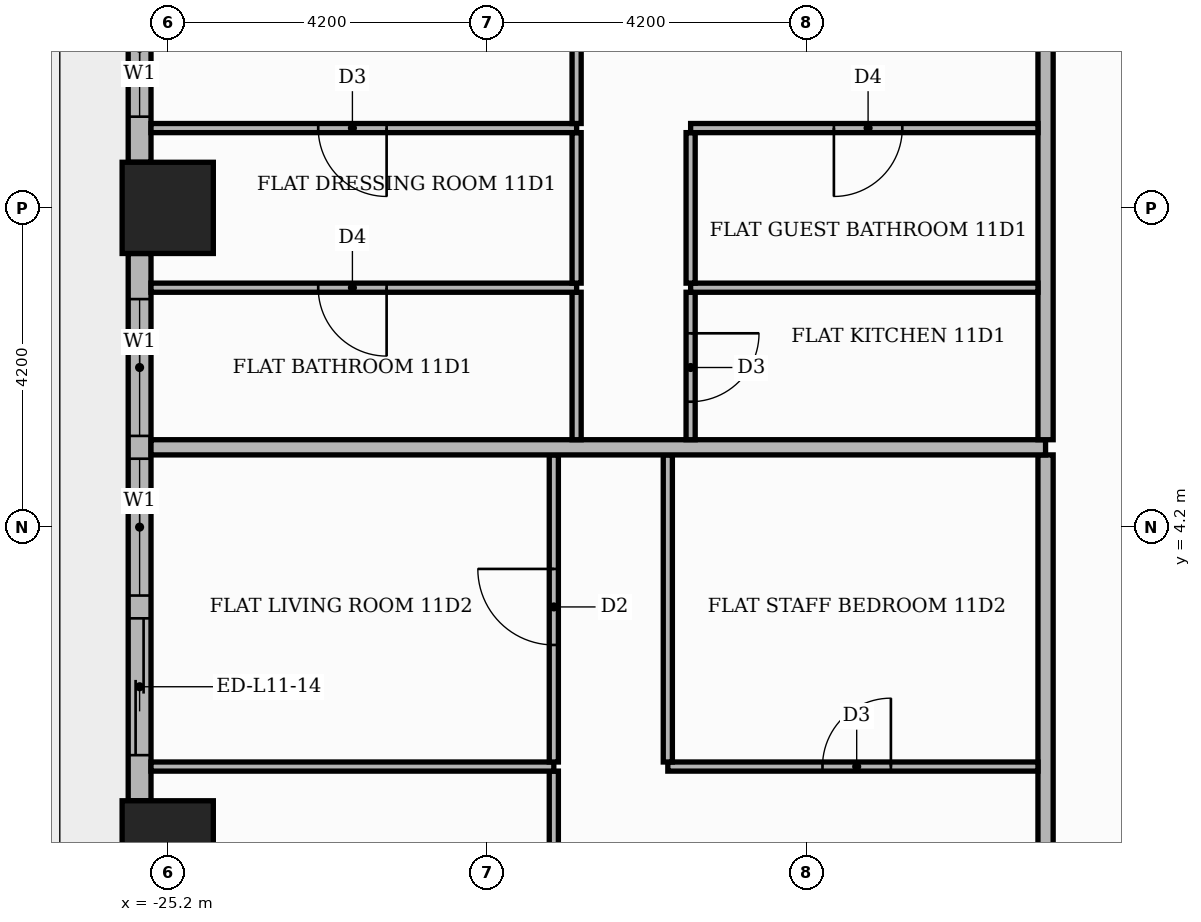
"""IFC4 building model, lengths in metres.
Left out: names, types, materials, properties, quantities, classifications, styles, units other than length and angle.
Written with IfcOpenShell. Run it as: python <this file> out.ifc"""

import sys

from ifc_helpers import new_model, si_unit, direction, frame, frame_2d, origin, origin_2d, place, context, subcontext, project, spatial, rectangle, extrude, element, fill, save


model = new_model("IFC4")
c1 = context("Model", 3, precision=1e-05, world=origin(), true_north=direction((0.0, 1.0)))
c2 = subcontext(c1, "Body", "Model", "MODEL_VIEW")
j1 = project(units=[si_unit("LENGTHUNIT", "METRE"), si_unit("PLANEANGLEUNIT", "RADIAN")], contexts=[c1])
p1 = place(None, origin())
s1 = spatial("IfcSite", under=j1, at=p1, CompositionType="ELEMENT")
p2 = place(p1, origin())
s2 = spatial("IfcBuilding", under=s1, at=p2, CompositionType="ELEMENT")
p3 = place(p2, frame((0.0, 0.0, 50.4)))
s3 = spatial("IfcBuildingStorey", under=s2, at=p3, CompositionType="ELEMENT", Elevation=50.4)
for number, where, z_axis, x_axis in (
    (1, (-25.2, 0.0, 0.0), (0.0, 0.0, 1.0), (1.0, 0.0, 0.0)),
    (2, (-25.2, 8.4, 0.0), (0.0, 0.0, 1.0), (1.0, 0.0, 0.0)),
):
    element("IfcColumn", number, at=place(p3, frame(where, z_axis=z_axis, x_axis=x_axis)), inside=s3, PredefinedType="COLUMN", context=c2, shape_type="SweptSolid", body=[
        extrude(rectangle(XDim=1.2, YDim=1.2, at=origin_2d()), origin(), (0.0, 0.0, 1.0), 3.9),
    ])
p4 = place(p3, frame((-25.57, 16.2, 0.0), z_axis=(0.0, 0.0, 1.0), x_axis=(0.0, -1.0, 0.0)))
e3 = element("IfcWall", 3, at=p4, inside=s3, PredefinedType="STANDARD", context=c2, shape_type="SweptSolid", body=[
    extrude(rectangle(XDim=7.2, YDim=0.3, at=frame_2d((3.6, 0.0))), origin(), (0.0, 0.0, 1.0), 3.48),
])
p5 = place(p4, frame((0.6, 0.0, 0.0)))
e4 = element("IfcOpeningElement", 4, at=p5, cuts=e3, PredefinedType="OPENING", context=c2, shape_type="SweptSolid", body=[
    extrude(rectangle(XDim=1.8, YDim=2.4, at=frame_2d((0.9, 1.2))), frame((0.0, 0.16, 0.0), z_axis=(0.0, -1.0, 0.0), x_axis=(1.0, 0.0, 0.0)), (0.0, 0.0, 1.0), 0.32),
])
p6 = place(p4, frame((2.7, 0.0, 0.0)))
e5 = element("IfcOpeningElement", 5, at=p6, cuts=e3, PredefinedType="OPENING", context=c2, shape_type="SweptSolid", body=[
    extrude(rectangle(XDim=1.8, YDim=2.4, at=frame_2d((0.9, 1.2))), frame((0.0, 0.16, 0.0), z_axis=(0.0, -1.0, 0.0), x_axis=(1.0, 0.0, 0.0)), (0.0, 0.0, 1.0), 0.32),
])
p7 = place(p4, frame((4.8, 0.0, 0.9)))
e6 = element("IfcOpeningElement", 6, at=p7, cuts=e3, PredefinedType="OPENING", context=c2, shape_type="SweptSolid", body=[
    extrude(rectangle(XDim=1.8, YDim=2.1, at=frame_2d((0.9, 1.05))), frame((0.0, 0.16, 0.0), z_axis=(0.0, -1.0, 0.0), x_axis=(1.0, 0.0, 0.0)), (0.0, 0.0, 1.0), 0.32),
])
p8 = place(p3, frame((-25.57, 7.8, 0.0), z_axis=(0.0, 0.0, 1.0), x_axis=(0.0, -1.0, 0.0)))
e7 = element("IfcWall", 7, at=p8, inside=s3, PredefinedType="STANDARD", context=c2, shape_type="SweptSolid", body=[
    extrude(rectangle(XDim=7.2, YDim=0.3, at=frame_2d((3.6, 0.0))), origin(), (0.0, 0.0, 1.0), 3.48),
])
p9 = place(p8, frame((0.6, 0.0, 0.9)))
e8 = element("IfcOpeningElement", 8, at=p9, cuts=e7, PredefinedType="OPENING", context=c2, shape_type="SweptSolid", body=[
    extrude(rectangle(XDim=1.8, YDim=2.1, at=frame_2d((0.9, 1.05))), frame((0.0, 0.16, 0.0), z_axis=(0.0, -1.0, 0.0), x_axis=(1.0, 0.0, 0.0)), (0.0, 0.0, 1.0), 0.32),
])
p10 = place(p8, frame((2.7, 0.0, 0.9)))
e9 = element("IfcOpeningElement", 9, at=p10, cuts=e7, PredefinedType="OPENING", context=c2, shape_type="SweptSolid", body=[
    extrude(rectangle(XDim=1.8, YDim=2.1, at=frame_2d((0.9, 1.05))), frame((0.0, 0.16, 0.0), z_axis=(0.0, -1.0, 0.0), x_axis=(1.0, 0.0, 0.0)), (0.0, 0.0, 1.0), 0.32),
])
p11 = place(p8, frame((4.8, 0.0, 0.0)))
e10 = element("IfcOpeningElement", 10, at=p11, cuts=e7, PredefinedType="OPENING", context=c2, shape_type="SweptSolid", body=[
    extrude(rectangle(XDim=1.8, YDim=2.4, at=frame_2d((0.9, 1.2))), frame((0.0, 0.16, 0.0), z_axis=(0.0, -1.0, 0.0), x_axis=(1.0, 0.0, 0.0)), (0.0, 0.0, 1.0), 0.32),
])
p12 = place(p3, frame((-13.65, -13.55, 0.0), z_axis=(0.0, 0.0, 1.0), x_axis=(0.0, 1.0, 0.0)))
e11 = element("IfcWall", 11, at=p12, inside=s3, PredefinedType="PARTITIONING", context=c2, shape_type="SweptSolid", body=[
    extrude(rectangle(XDim=18.7, YDim=0.2, at=frame_2d((9.35, 0.0))), origin(), (0.0, 0.0, 1.0), 3.48),
])
p13 = place(p12, frame((11.95, 0.0, 0.0)))
e12 = element("IfcOpeningElement", 12, at=p13, cuts=e11, PredefinedType="OPENING", context=c2, shape_type="SweptSolid", body=[
    extrude(rectangle(XDim=1.1, YDim=2.4, at=frame_2d((0.55, 1.2))), frame((0.0, 0.11, 0.0), z_axis=(0.0, -1.0, 0.0), x_axis=(1.0, 0.0, 0.0)), (0.0, 0.0, 1.0), 0.22),
])
p14 = place(p3, frame((-20.12, -3.09, 0.0), z_axis=(0.0, 0.0, 1.0), x_axis=(0.0, 1.0, 0.0)))
e13 = element("IfcWall", 13, at=p14, inside=s3, PredefinedType="PARTITIONING", context=c2, shape_type="SweptSolid", body=[
    extrude(rectangle(XDim=4.08, YDim=0.12, at=frame_2d((2.04, 0.0))), origin(), (0.0, 0.0, 1.0), 3.48),
])
p15 = place(p14, frame((1.59, 0.0, 0.0)))
e14 = element("IfcOpeningElement", 14, at=p15, cuts=e13, PredefinedType="OPENING", context=c2, shape_type="SweptSolid", body=[
    extrude(rectangle(XDim=0.9, YDim=2.1, at=frame_2d((0.45, 1.05))), frame((0.0, 0.07, 0.0), z_axis=(0.0, -1.0, 0.0), x_axis=(1.0, 0.0, 0.0)), (0.0, 0.0, 1.0), 0.14),
])
p16 = place(p3, frame((-25.42, 1.05, 0.0), z_axis=(0.0, 0.0, 1.0), x_axis=(1.0, 0.0, 0.0)))
e15 = element("IfcWall", 15, at=p16, inside=s3, PredefinedType="PARTITIONING", context=c2, shape_type="SweptSolid", body=[
    extrude(rectangle(XDim=5.3, YDim=0.12, at=frame_2d((2.65, 0.0))), origin(), (0.0, 0.0, 1.0), 3.48),
])
p17 = place(p3, frame((-18.62, 1.05, 0.0), z_axis=(0.0, 0.0, 1.0), x_axis=(1.0, 0.0, 0.0)))
e16 = element("IfcWall", 16, at=p17, inside=s3, PredefinedType="PARTITIONING", context=c2, shape_type="SweptSolid", body=[
    extrude(rectangle(XDim=4.87, YDim=0.12, at=frame_2d((2.435, 0.0))), origin(), (0.0, 0.0, 1.0), 3.48),
])
p18 = place(p17, frame((2.035, 0.0, 0.0)))
e17 = element("IfcOpeningElement", 17, at=p18, cuts=e16, PredefinedType="OPENING", context=c2, shape_type="SweptSolid", body=[
    extrude(rectangle(XDim=0.9, YDim=2.1, at=frame_2d((0.45, 1.05))), frame((0.0, 0.07, 0.0), z_axis=(0.0, -1.0, 0.0), x_axis=(1.0, 0.0, 0.0)), (0.0, 0.0, 1.0), 0.14),
])
p19 = place(p3, frame((-20.12, 1.11, 0.0), z_axis=(0.0, 0.0, 1.0), x_axis=(0.0, 1.0, 0.0)))
e18 = element("IfcWall", 18, at=p19, inside=s3, PredefinedType="PARTITIONING", context=c2, shape_type="SweptSolid", body=[
    extrude(rectangle(XDim=4.04, YDim=0.12, at=frame_2d((2.02, 0.0))), origin(), (0.0, 0.0, 1.0), 3.48),
])
p20 = place(p19, frame((1.54, 0.0, 0.0)))
e19 = element("IfcOpeningElement", 19, at=p20, cuts=e18, PredefinedType="OPENING", context=c2, shape_type="SweptSolid", body=[
    extrude(rectangle(XDim=1.0, YDim=2.1, at=frame_2d((0.5, 1.05))), frame((0.0, 0.07, 0.0), z_axis=(0.0, -1.0, 0.0), x_axis=(1.0, 0.0, 0.0)), (0.0, 0.0, 1.0), 0.14),
])
p21 = place(p3, frame((-18.62, 1.11, 0.0), z_axis=(0.0, 0.0, 1.0), x_axis=(0.0, 1.0, 0.0)))
e20 = element("IfcWall", 20, at=p21, inside=s3, PredefinedType="PARTITIONING", context=c2, shape_type="SweptSolid", body=[
    extrude(rectangle(XDim=4.04, YDim=0.12, at=frame_2d((2.02, 0.0))), origin(), (0.0, 0.0, 1.0), 3.48),
])
p22 = place(p3, frame((-25.42, 5.25, 0.0), z_axis=(0.0, 0.0, 1.0), x_axis=(1.0, 0.0, 0.0)))
e21 = element("IfcWall", 21, at=p22, inside=s3, PredefinedType="PARTITIONING", context=c2, shape_type="SweptSolid", body=[
    extrude(rectangle(XDim=11.77, YDim=0.2, at=frame_2d((5.885, 0.0))), origin(), (0.0, 0.0, 1.0), 3.48),
])
p23 = place(p3, frame((-19.82, 5.35, 0.0), z_axis=(0.0, 0.0, 1.0), x_axis=(0.0, 1.0, 0.0)))
e22 = element("IfcWall", 22, at=p23, inside=s3, PredefinedType="PARTITIONING", context=c2, shape_type="SweptSolid", body=[
    extrude(rectangle(XDim=1.94, YDim=0.12, at=frame_2d((0.97, 0.0))), origin(), (0.0, 0.0, 1.0), 3.48),
])
p24 = place(p3, frame((-18.32, 5.35, 0.0), z_axis=(0.0, 0.0, 1.0), x_axis=(0.0, 1.0, 0.0)))
e23 = element("IfcWall", 23, at=p24, inside=s3, PredefinedType="PARTITIONING", context=c2, shape_type="SweptSolid", body=[
    extrude(rectangle(XDim=1.94, YDim=0.12, at=frame_2d((0.97, 0.0))), origin(), (0.0, 0.0, 1.0), 3.48),
])
p25 = place(p24, frame((0.5, 0.0, 0.0)))
e24 = element("IfcOpeningElement", 24, at=p25, cuts=e23, PredefinedType="OPENING", context=c2, shape_type="SweptSolid", body=[
    extrude(rectangle(XDim=0.9, YDim=2.1, at=frame_2d((0.45, 1.05))), frame((0.0, 0.07, 0.0), z_axis=(0.0, -1.0, 0.0), x_axis=(1.0, 0.0, 0.0)), (0.0, 0.0, 1.0), 0.14),
])
p26 = place(p3, frame((-13.65, 5.35, 0.0), z_axis=(0.0, 0.0, 1.0), x_axis=(0.0, 1.0, 0.0)))
e25 = element("IfcWall", 25, at=p26, inside=s3, PredefinedType="PARTITIONING", context=c2, shape_type="SweptSolid", body=[
    extrude(rectangle(XDim=8.2, YDim=0.2, at=frame_2d((4.1, 0.0))), origin(), (0.0, 0.0, 1.0), 3.48),
])
p27 = place(p26, frame((5.65, 0.0, 0.0)))
e26 = element("IfcOpeningElement", 26, at=p27, cuts=e25, PredefinedType="OPENING", context=c2, shape_type="SweptSolid", body=[
    extrude(rectangle(XDim=1.1, YDim=2.4, at=frame_2d((0.55, 1.2))), frame((0.0, 0.11, 0.0), z_axis=(0.0, -1.0, 0.0), x_axis=(1.0, 0.0, 0.0)), (0.0, 0.0, 1.0), 0.22),
])
p28 = place(p3, frame((-25.42, 7.35, 0.0), z_axis=(0.0, 0.0, 1.0), x_axis=(1.0, 0.0, 0.0)))
e27 = element("IfcWall", 27, at=p28, inside=s3, PredefinedType="PARTITIONING", context=c2, shape_type="SweptSolid", body=[
    extrude(rectangle(XDim=5.6, YDim=0.12, at=frame_2d((2.8, 0.0))), origin(), (0.0, 0.0, 1.0), 3.48),
])
p29 = place(p28, frame((2.2, 0.0, 0.0)))
e28 = element("IfcOpeningElement", 28, at=p29, cuts=e27, PredefinedType="OPENING", context=c2, shape_type="SweptSolid", body=[
    extrude(rectangle(XDim=0.9, YDim=2.1, at=frame_2d((0.45, 1.05))), frame((0.0, 0.07, 0.0), z_axis=(0.0, -1.0, 0.0), x_axis=(1.0, 0.0, 0.0)), (0.0, 0.0, 1.0), 0.14),
])
p30 = place(p3, frame((-18.32, 7.35, 0.0), z_axis=(0.0, 0.0, 1.0), x_axis=(1.0, 0.0, 0.0)))
e29 = element("IfcWall", 29, at=p30, inside=s3, PredefinedType="PARTITIONING", context=c2, shape_type="SweptSolid", body=[
    extrude(rectangle(XDim=4.57, YDim=0.12, at=frame_2d((2.285, 0.0))), origin(), (0.0, 0.0, 1.0), 3.48),
])
for number, where, z_axis, x_axis in (
    (30, (-19.82, 7.41, 0.0), (0.0, 0.0, 1.0), (0.0, 1.0, 0.0)),
    (31, (-18.32, 7.41, 0.0), (0.0, 0.0, 1.0), (0.0, 1.0, 0.0)),
):
    element("IfcWall", number, at=place(p3, frame(where, z_axis=z_axis, x_axis=x_axis)), inside=s3, PredefinedType="PARTITIONING", context=c2, shape_type="SweptSolid", body=[
        extrude(rectangle(XDim=1.98, YDim=0.12, at=frame_2d((0.99, 0.0))), origin(), (0.0, 0.0, 1.0), 3.48),
    ])
p31 = place(p3, frame((-25.42, 9.45, 0.0), z_axis=(0.0, 0.0, 1.0), x_axis=(1.0, 0.0, 0.0)))
e32 = element("IfcWall", 32, at=p31, inside=s3, PredefinedType="PARTITIONING", context=c2, shape_type="SweptSolid", body=[
    extrude(rectangle(XDim=5.6, YDim=0.12, at=frame_2d((2.8, 0.0))), origin(), (0.0, 0.0, 1.0), 3.48),
])
p32 = place(p31, frame((2.2, 0.0, 0.0)))
e33 = element("IfcOpeningElement", 33, at=p32, cuts=e32, PredefinedType="OPENING", context=c2, shape_type="SweptSolid", body=[
    extrude(rectangle(XDim=0.9, YDim=2.1, at=frame_2d((0.45, 1.05))), frame((0.0, 0.07, 0.0), z_axis=(0.0, -1.0, 0.0), x_axis=(1.0, 0.0, 0.0)), (0.0, 0.0, 1.0), 0.14),
])
p33 = place(p3, frame((-18.32, 9.45, 0.0), z_axis=(0.0, 0.0, 1.0), x_axis=(1.0, 0.0, 0.0)))
e34 = element("IfcWall", 34, at=p33, inside=s3, PredefinedType="PARTITIONING", context=c2, shape_type="SweptSolid", body=[
    extrude(rectangle(XDim=4.57, YDim=0.12, at=frame_2d((2.285, 0.0))), origin(), (0.0, 0.0, 1.0), 3.48),
])
p34 = place(p33, frame((1.885, 0.0, 0.0)))
e35 = element("IfcOpeningElement", 35, at=p34, cuts=e34, PredefinedType="OPENING", context=c2, shape_type="SweptSolid", body=[
    extrude(rectangle(XDim=0.9, YDim=2.1, at=frame_2d((0.45, 1.05))), frame((0.0, 0.07, 0.0), z_axis=(0.0, -1.0, 0.0), x_axis=(1.0, 0.0, 0.0)), (0.0, 0.0, 1.0), 0.14),
])
p35 = place(p3, frame((-19.82, 9.51, 0.0), z_axis=(0.0, 0.0, 1.0), x_axis=(0.0, 1.0, 0.0)))
e36 = element("IfcWall", 36, at=p35, inside=s3, PredefinedType="PARTITIONING", context=c2, shape_type="SweptSolid", body=[
    extrude(rectangle(XDim=4.08, YDim=0.12, at=frame_2d((2.04, 0.0))), origin(), (0.0, 0.0, 1.0), 3.48),
])
p36 = place(p35, frame((1.59, 0.0, 0.0)))
e37 = element("IfcOpeningElement", 37, at=p36, cuts=e36, PredefinedType="OPENING", context=c2, shape_type="SweptSolid", body=[
    extrude(rectangle(XDim=0.9, YDim=2.1, at=frame_2d((0.45, 1.05))), frame((0.0, 0.07, 0.0), z_axis=(0.0, -1.0, 0.0), x_axis=(1.0, 0.0, 0.0)), (0.0, 0.0, 1.0), 0.14),
])
p37 = place(p7, origin())
e38 = element("IfcWindow", 38, at=p37, inside=s3, PartitioningType="SINGLE_PANEL", PredefinedType="WINDOW", context=c2, shape_type="SweptSolid", body=[
    extrude(rectangle(XDim=1.8, YDim=2.1, at=frame_2d((0.9, 1.05))), frame((0.0, 0.03, 0.0), z_axis=(0.0, -1.0, 0.0), x_axis=(1.0, 0.0, 0.0)), (0.0, 0.0, 1.0), 0.06),
])
fill(e6, e38)
p38 = place(p9, origin())
e39 = element("IfcWindow", 39, at=p38, inside=s3, PartitioningType="SINGLE_PANEL", PredefinedType="WINDOW", context=c2, shape_type="SweptSolid", body=[
    extrude(rectangle(XDim=1.8, YDim=2.1, at=frame_2d((0.9, 1.05))), frame((0.0, 0.03, 0.0), z_axis=(0.0, -1.0, 0.0), x_axis=(1.0, 0.0, 0.0)), (0.0, 0.0, 1.0), 0.06),
])
fill(e8, e39)
p39 = place(p10, origin())
e40 = element("IfcWindow", 40, at=p39, inside=s3, PartitioningType="SINGLE_PANEL", PredefinedType="WINDOW", context=c2, shape_type="SweptSolid", body=[
    extrude(rectangle(XDim=1.8, YDim=2.1, at=frame_2d((0.9, 1.05))), frame((0.0, 0.03, 0.0), z_axis=(0.0, -1.0, 0.0), x_axis=(1.0, 0.0, 0.0)), (0.0, 0.0, 1.0), 0.06),
])
fill(e9, e40)
p40 = place(p11, origin())
e41 = element("IfcDoor", 41, at=p40, inside=s3, OperationType="SLIDING_TO_RIGHT", PredefinedType="DOOR", context=c2, shape_type="SweptSolid", body=[
    extrude(rectangle(XDim=1.8, YDim=2.4, at=frame_2d((0.9, 1.2))), frame((0.0, 0.025, 0.0), z_axis=(0.0, -1.0, 0.0), x_axis=(1.0, 0.0, 0.0)), (0.0, 0.0, 1.0), 0.05),
])
fill(e10, e41)
p41 = place(p34, frame((0.9, 0.0, 0.0), z_axis=(0.0, 0.0, 1.0), x_axis=(-1.0, 0.0, 0.0)))
e42 = element("IfcDoor", 42, at=p41, inside=s3, OperationType="SINGLE_SWING_LEFT", PredefinedType="DOOR", context=c2, shape_type="SweptSolid", body=[
    extrude(rectangle(XDim=0.9, YDim=2.1, at=frame_2d((0.45, 1.05))), frame((0.0, 0.025, 0.0), z_axis=(0.0, -1.0, 0.0), x_axis=(1.0, 0.0, 0.0)), (0.0, 0.0, 1.0), 0.05),
])
fill(e35, e42)
p42 = place(p25, frame((0.9, 0.0, 0.0), z_axis=(0.0, 0.0, 1.0), x_axis=(-1.0, 0.0, 0.0)))
e43 = element("IfcDoor", 43, at=p42, inside=s3, OperationType="SINGLE_SWING_RIGHT", PredefinedType="DOOR", context=c2, shape_type="SweptSolid", body=[
    extrude(rectangle(XDim=0.9, YDim=2.1, at=frame_2d((0.45, 1.05))), frame((0.0, 0.025, 0.0), z_axis=(0.0, -1.0, 0.0), x_axis=(1.0, 0.0, 0.0)), (0.0, 0.0, 1.0), 0.05),
])
fill(e24, e43)
p43 = place(p32, frame((0.9, 0.0, 0.0), z_axis=(0.0, 0.0, 1.0), x_axis=(-1.0, 0.0, 0.0)))
e44 = element("IfcDoor", 44, at=p43, inside=s3, OperationType="SINGLE_SWING_RIGHT", PredefinedType="DOOR", context=c2, shape_type="SweptSolid", body=[
    extrude(rectangle(XDim=0.9, YDim=2.1, at=frame_2d((0.45, 1.05))), frame((0.0, 0.025, 0.0), z_axis=(0.0, -1.0, 0.0), x_axis=(1.0, 0.0, 0.0)), (0.0, 0.0, 1.0), 0.05),
])
fill(e33, e44)
p44 = place(p29, frame((0.9, 0.0, 0.0), z_axis=(0.0, 0.0, 1.0), x_axis=(-1.0, 0.0, 0.0)))
e45 = element("IfcDoor", 45, at=p44, inside=s3, OperationType="SINGLE_SWING_RIGHT", PredefinedType="DOOR", context=c2, shape_type="SweptSolid", body=[
    extrude(rectangle(XDim=0.9, YDim=2.1, at=frame_2d((0.45, 1.05))), frame((0.0, 0.025, 0.0), z_axis=(0.0, -1.0, 0.0), x_axis=(1.0, 0.0, 0.0)), (0.0, 0.0, 1.0), 0.05),
])
fill(e28, e45)
p45 = place(p18, origin())
e46 = element("IfcDoor", 46, at=p45, inside=s3, OperationType="SINGLE_SWING_RIGHT", PredefinedType="DOOR", context=c2, shape_type="SweptSolid", body=[
    extrude(rectangle(XDim=0.9, YDim=2.1, at=frame_2d((0.45, 1.05))), frame((0.0, 0.025, 0.0), z_axis=(0.0, -1.0, 0.0), x_axis=(1.0, 0.0, 0.0)), (0.0, 0.0, 1.0), 0.05),
])
fill(e17, e46)
p46 = place(p20, origin())
e47 = element("IfcDoor", 47, at=p46, inside=s3, OperationType="SINGLE_SWING_RIGHT", PredefinedType="DOOR", context=c2, shape_type="SweptSolid", body=[
    extrude(rectangle(XDim=1.0, YDim=2.1, at=frame_2d((0.5, 1.05))), frame((0.0, 0.025, 0.0), z_axis=(0.0, -1.0, 0.0), x_axis=(1.0, 0.0, 0.0)), (0.0, 0.0, 1.0), 0.05),
])
fill(e19, e47)
save(model, sys.argv[1])
